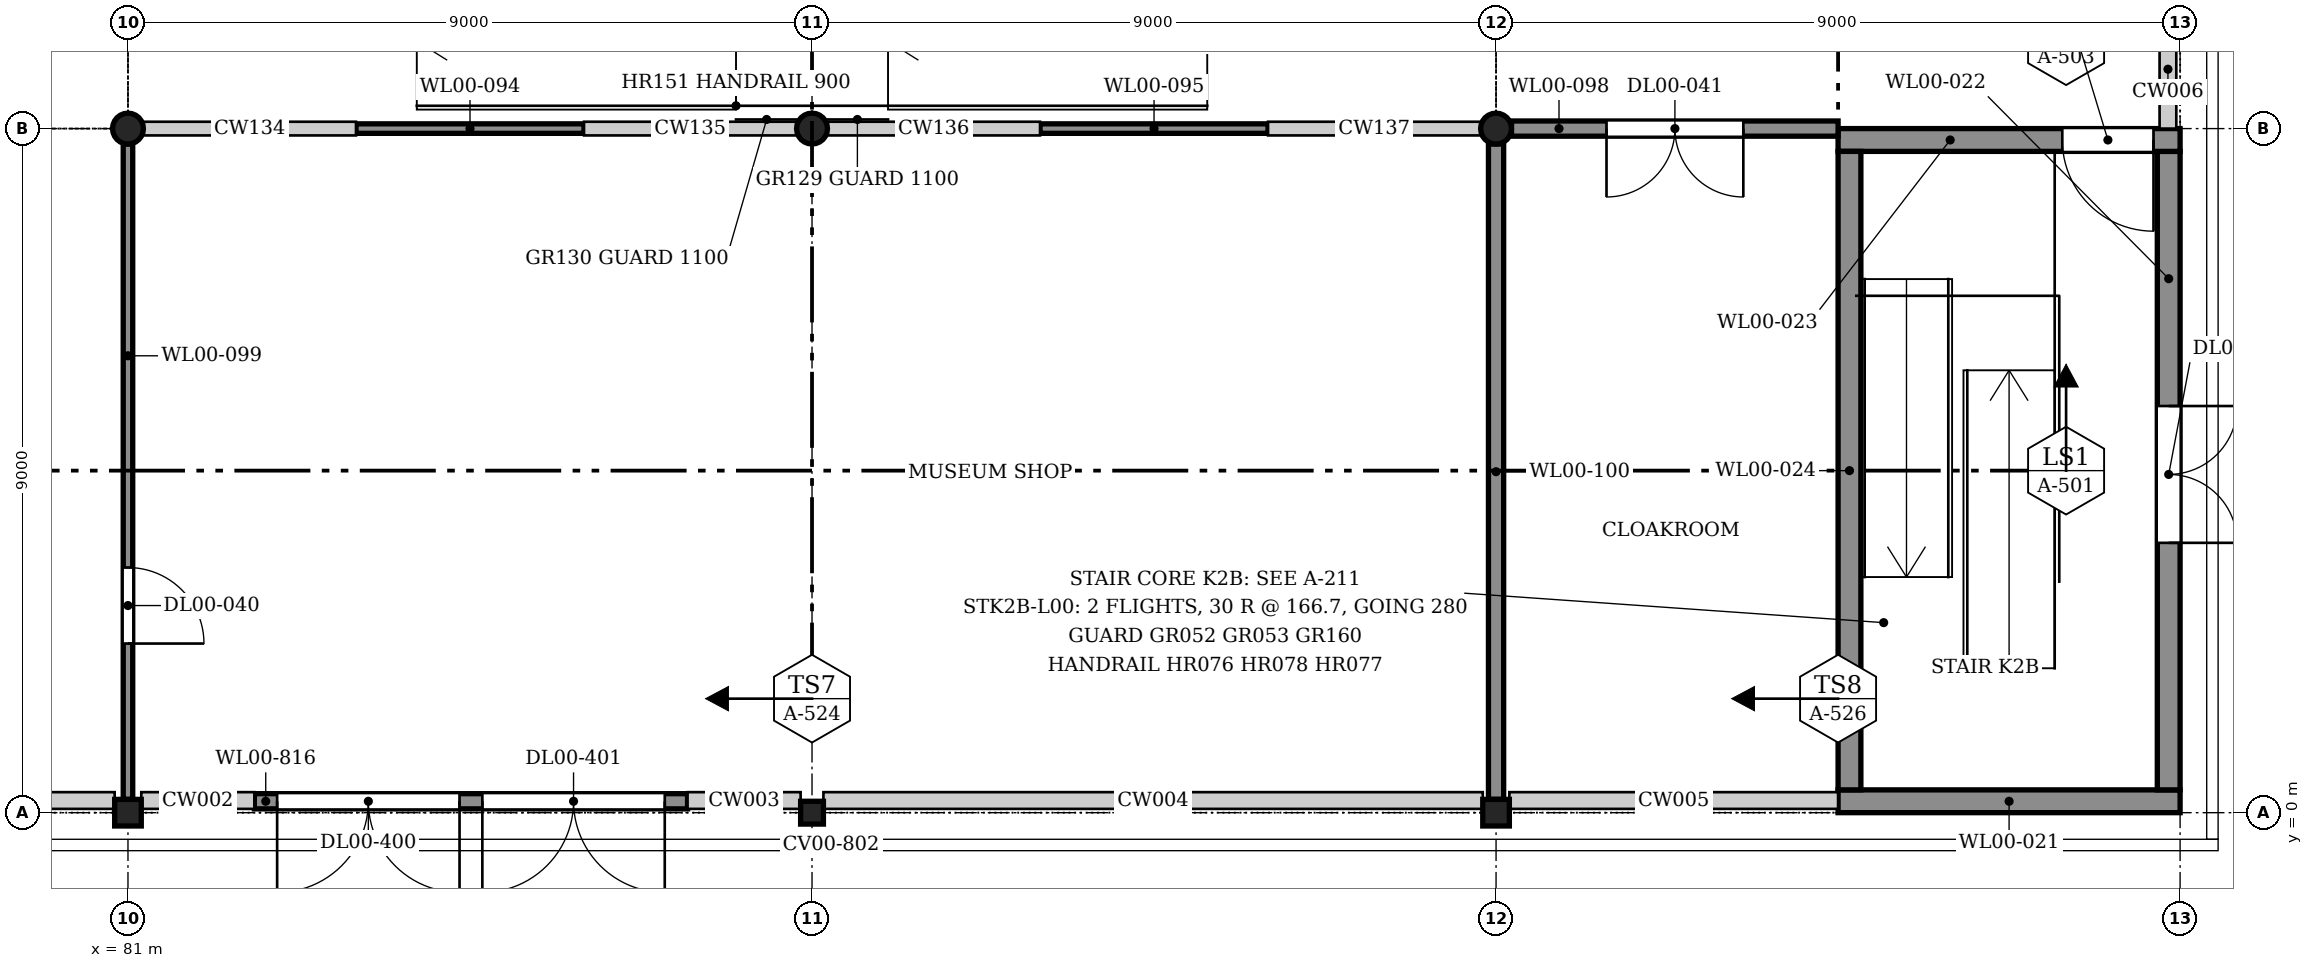
"""IFC4 building model, lengths in metres.
Left out: names, types, materials, properties, quantities, classifications, styles, units other than length and angle.
Written with IfcOpenShell. Run it as: python <this file> out.ifc"""

import sys

from ifc_helpers import new_model, si_unit, direction, frame, frame_2d, origin, origin_2d, place, context, subcontext, project, spatial, rectangle, hollow_rectangle, hollow_circle, extrude, element, fill, save


model = new_model("IFC4")
c1 = context("Model", 3, precision=1e-05, world=origin(), true_north=direction((0.0, 1.0)))
c2 = subcontext(c1, "Body", "Model", "MODEL_VIEW")
j1 = project(units=[si_unit("LENGTHUNIT", "METRE"), si_unit("PLANEANGLEUNIT", "RADIAN")], contexts=[c1])
p1 = place(None, origin())
s1 = spatial("IfcSite", under=j1, at=p1, CompositionType="ELEMENT")
p2 = place(p1, origin())
s2 = spatial("IfcBuilding", under=s1, at=p2, CompositionType="ELEMENT")
p3 = place(p2, origin())
s3 = spatial("IfcBuildingStorey", under=s2, at=p3, CompositionType="ELEMENT", Elevation=0.0)
p4 = place(p3, frame((81.0, 0.0, 0.0), z_axis=(0.0, 0.0, 1.0), x_axis=(1.0, 0.0, 0.0)))
e1 = element("IfcColumn", 1, at=p4, inside=s3, PredefinedType="COLUMN", context=c2, shape_type="SweptSolid", body=[
    extrude(hollow_rectangle(XDim=0.35, YDim=0.35, WallThickness=0.016, InnerFilletRadius=0.024, OuterFilletRadius=0.04, at=origin_2d()), origin(), (0.0, 0.0, 1.0), 5.0),
])
p5 = place(p3, frame((90.0, 0.0, 0.0), z_axis=(0.0, 0.0, 1.0), x_axis=(1.0, 0.0, 0.0)))
e2 = element("IfcColumn", 2, at=p5, inside=s3, PredefinedType="COLUMN", context=c2, shape_type="SweptSolid", body=[
    extrude(hollow_rectangle(XDim=0.3, YDim=0.3, WallThickness=0.016, InnerFilletRadius=0.024, OuterFilletRadius=0.04, at=origin_2d()), origin(), (0.0, 0.0, 1.0), 5.0),
])
p6 = place(p3, frame((99.0, 0.0, 0.0), z_axis=(0.0, 0.0, 1.0), x_axis=(1.0, 0.0, 0.0)))
e3 = element("IfcColumn", 3, at=p6, inside=s3, PredefinedType="COLUMN", context=c2, shape_type="SweptSolid", body=[
    extrude(hollow_rectangle(XDim=0.35, YDim=0.35, WallThickness=0.016, InnerFilletRadius=0.024, OuterFilletRadius=0.04, at=origin_2d()), origin(), (0.0, 0.0, 1.0), 5.0),
])
for number, where, z_axis, x_axis in (
    (4, (81.0, 9.0, 0.0), (0.0, 0.0, 1.0), (1.0, 0.0, 0.0)),
    (5, (90.0, 9.0, 0.0), (0.0, 0.0, 1.0), (1.0, 0.0, 0.0)),
    (6, (99.0, 9.0, 0.0), (0.0, 0.0, 1.0), (1.0, 0.0, 0.0)),
):
    element("IfcColumn", number, at=place(p3, frame(where, z_axis=z_axis, x_axis=x_axis)), inside=s3, PredefinedType="COLUMN", context=c2, shape_type="SweptSolid", body=[
        extrude(hollow_circle(Radius=0.203, WallThickness=0.013, at=origin_2d()), origin(), (0.0, 0.0, 1.0), 5.0),
    ])
p7 = place(p3, frame((82.663, 0.15, 0.0), z_axis=(0.0, 0.0, 1.0), x_axis=(1.0, 0.0, 0.0)))
e7 = element("IfcWall", 7, at=p7, inside=s3, PredefinedType="SOLIDWALL", context=c2, shape_type="SweptSolid", body=[
    extrude(rectangle(XDim=5.7, YDim=0.2, at=frame_2d((2.85, 0.0))), origin(), (0.0, 0.0, 1.0), 4.835),
])
p8 = place(p7, frame((0.3, 0.0, 0.0)))
e8 = element("IfcOpeningElement", 8, at=p8, cuts=e7, PredefinedType="OPENING", context=c2, shape_type="SweptSolid", body=[
    extrude(rectangle(XDim=2.4, YDim=2.4, at=frame_2d((1.2, 1.2))), frame((0.0, 0.11, 0.0), z_axis=(0.0, -1.0, 0.0), x_axis=(1.0, 0.0, 0.0)), (0.0, 0.0, 1.0), 0.22),
])
p9 = place(p7, frame((3.0, 0.0, 0.0)))
e9 = element("IfcOpeningElement", 9, at=p9, cuts=e7, PredefinedType="OPENING", context=c2, shape_type="SweptSolid", body=[
    extrude(rectangle(XDim=2.4, YDim=2.4, at=frame_2d((1.2, 1.2))), frame((0.0, 0.11, 0.0), z_axis=(0.0, -1.0, 0.0), x_axis=(1.0, 0.0, 0.0)), (0.0, 0.0, 1.0), 0.22),
])
p10 = place(p3, frame((103.5, 0.15, 0.0), z_axis=(0.0, 0.0, 1.0), x_axis=(1.0, 0.0, 0.0)))
e10 = element("IfcWall", 10, at=p10, inside=s3, PredefinedType="SOLIDWALL", context=c2, shape_type="SweptSolid", body=[
    extrude(rectangle(XDim=4.5, YDim=0.3, at=frame_2d((2.25, 0.0))), origin(), (0.0, 0.0, 1.0), 5.0),
])
p11 = place(p3, frame((107.85, 0.3, 0.0), z_axis=(0.0, 0.0, 1.0), x_axis=(0.0, 1.0, 0.0)))
e11 = element("IfcWall", 11, at=p11, inside=s3, PredefinedType="SOLIDWALL", context=c2, shape_type="SweptSolid", body=[
    extrude(rectangle(XDim=8.4, YDim=0.3, at=frame_2d((4.2, 0.0))), origin(), (0.0, 0.0, 1.0), 5.0),
])
p12 = place(p11, frame((3.25, 0.0, 0.0)))
e12 = element("IfcOpeningElement", 12, at=p12, cuts=e11, PredefinedType="OPENING", context=c2, shape_type="SweptSolid", body=[
    extrude(rectangle(XDim=1.8, YDim=2.1, at=frame_2d((0.9, 1.05))), frame((0.0, 0.16, 0.0), z_axis=(0.0, -1.0, 0.0), x_axis=(1.0, 0.0, 0.0)), (0.0, 0.0, 1.0), 0.32),
])
p13 = place(p3, frame((103.5, 8.85, 0.0), z_axis=(0.0, 0.0, 1.0), x_axis=(1.0, 0.0, 0.0)))
e13 = element("IfcWall", 13, at=p13, inside=s3, PredefinedType="SOLIDWALL", context=c2, shape_type="SweptSolid", body=[
    extrude(rectangle(XDim=4.5, YDim=0.3, at=frame_2d((2.25, 0.0))), origin(), (0.0, 0.0, 1.0), 5.0),
])
p14 = place(p13, frame((2.95, 0.0, 0.0)))
e14 = element("IfcOpeningElement", 14, at=p14, cuts=e13, PredefinedType="OPENING", context=c2, shape_type="SweptSolid", body=[
    extrude(rectangle(XDim=1.2, YDim=2.1, at=frame_2d((0.6, 1.05))), frame((0.0, 0.16, 0.0), z_axis=(0.0, -1.0, 0.0), x_axis=(1.0, 0.0, 0.0)), (0.0, 0.0, 1.0), 0.32),
])
p15 = place(p3, frame((103.65, 0.3, 0.0), z_axis=(0.0, 0.0, 1.0), x_axis=(0.0, 1.0, 0.0)))
e15 = element("IfcWall", 15, at=p15, inside=s3, PredefinedType="SOLIDWALL", context=c2, shape_type="SweptSolid", body=[
    extrude(rectangle(XDim=8.4, YDim=0.3, at=frame_2d((4.2, 0.0))), origin(), (0.0, 0.0, 1.0), 5.0),
])
for number, where, z_axis, x_axis in (
    (16, (84.0, 9.0, 0.0), (0.0, 0.0, 1.0), (1.0, 0.0, 0.0)),
    (17, (93.0, 9.0, 0.0), (0.0, 0.0, 1.0), (1.0, 0.0, 0.0)),
):
    element("IfcWall", number, at=place(p3, frame(where, z_axis=z_axis, x_axis=x_axis)), inside=s3, PredefinedType="PARTITIONING", context=c2, shape_type="SweptSolid", body=[
        extrude(rectangle(XDim=3.0, YDim=0.125, at=frame_2d((1.5, 0.0))), origin(), (0.0, 0.0, 1.0), 4.228),
    ])
p16 = place(p3, frame((99.203, 9.0, 0.0), z_axis=(0.0, 0.0, 1.0), x_axis=(1.0, 0.0, 0.0)))
e18 = element("IfcWall", 18, at=p16, inside=s3, PredefinedType="PARTITIONING", context=c2, shape_type="SweptSolid", body=[
    extrude(rectangle(XDim=4.297, YDim=0.2, at=frame_2d((2.148, 0.0))), origin(), (0.0, 0.0, 1.0), 4.302),
])
p17 = place(p16, frame((1.25, 0.0, 0.0)))
e19 = element("IfcOpeningElement", 19, at=p17, cuts=e18, PredefinedType="OPENING", context=c2, shape_type="SweptSolid", body=[
    extrude(rectangle(XDim=1.8, YDim=2.1, at=frame_2d((0.9, 1.05))), frame((0.0, 0.11, 0.0), z_axis=(0.0, -1.0, 0.0), x_axis=(1.0, 0.0, 0.0)), (0.0, 0.0, 1.0), 0.22),
])
p18 = place(p3, frame((81.0, 0.175, 0.0), z_axis=(0.0, 0.0, 1.0), x_axis=(0.0, 1.0, 0.0)))
e20 = element("IfcWall", 20, at=p18, inside=s3, PredefinedType="PARTITIONING", context=c2, shape_type="SweptSolid", body=[
    extrude(rectangle(XDim=8.622, YDim=0.125, at=frame_2d((4.311, 0.0))), origin(), (0.0, 0.0, 1.0), 4.302),
])
p19 = place(p18, frame((2.05, 0.0, 0.0)))
e21 = element("IfcOpeningElement", 21, at=p19, cuts=e20, PredefinedType="OPENING", context=c2, shape_type="SweptSolid", body=[
    extrude(rectangle(XDim=1.0, YDim=2.1, at=frame_2d((0.5, 1.05))), frame((0.0, 0.073, 0.0), z_axis=(0.0, -1.0, 0.0), x_axis=(1.0, 0.0, 0.0)), (0.0, 0.0, 1.0), 0.145),
])
p20 = place(p3, frame((99.0, 0.175, 0.0), z_axis=(0.0, 0.0, 1.0), x_axis=(0.0, 1.0, 0.0)))
e22 = element("IfcWall", 22, at=p20, inside=s3, PredefinedType="PARTITIONING", context=c2, shape_type="SweptSolid", body=[
    extrude(rectangle(XDim=8.622, YDim=0.2, at=frame_2d((4.311, 0.0))), origin(), (0.0, 0.0, 1.0), 4.302),
])
p21 = place(p8, frame((2.4, 0.0, 0.0), z_axis=(0.0, 0.0, 1.0), x_axis=(-1.0, 0.0, 0.0)))
e23 = element("IfcDoor", 23, at=p21, inside=s3, OperationType="DOUBLE_DOOR_SINGLE_SWING", PredefinedType="DOOR", context=c2, shape_type="SweptSolid", body=[
    extrude(rectangle(XDim=2.4, YDim=2.4, at=frame_2d((1.2, 1.2))), frame((0.0, 0.025, 0.0), z_axis=(0.0, -1.0, 0.0), x_axis=(1.0, 0.0, 0.0)), (0.0, 0.0, 1.0), 0.05),
])
fill(e8, e23)
p22 = place(p9, frame((2.4, 0.0, 0.0), z_axis=(0.0, 0.0, 1.0), x_axis=(-1.0, 0.0, 0.0)))
e24 = element("IfcDoor", 24, at=p22, inside=s3, OperationType="DOUBLE_DOOR_SINGLE_SWING", PredefinedType="DOOR", context=c2, shape_type="SweptSolid", body=[
    extrude(rectangle(XDim=2.4, YDim=2.4, at=frame_2d((1.2, 1.2))), frame((0.0, 0.025, 0.0), z_axis=(0.0, -1.0, 0.0), x_axis=(1.0, 0.0, 0.0)), (0.0, 0.0, 1.0), 0.05),
])
fill(e9, e24)
p23 = place(p12, frame((1.8, 0.0, 0.0), z_axis=(0.0, 0.0, 1.0), x_axis=(-1.0, 0.0, 0.0)))
e25 = element("IfcDoor", 25, at=p23, inside=s3, OperationType="DOUBLE_DOOR_SINGLE_SWING", PredefinedType="DOOR", context=c2, shape_type="SweptSolid", body=[
    extrude(rectangle(XDim=1.8, YDim=2.1, at=frame_2d((0.9, 1.05))), frame((0.0, 0.025, 0.0), z_axis=(0.0, -1.0, 0.0), x_axis=(1.0, 0.0, 0.0)), (0.0, 0.0, 1.0), 0.05),
])
fill(e12, e25)
p24 = place(p14, frame((1.2, 0.0, 0.0), z_axis=(0.0, 0.0, 1.0), x_axis=(-1.0, 0.0, 0.0)))
e26 = element("IfcDoor", 26, at=p24, inside=s3, OperationType="SINGLE_SWING_RIGHT", PredefinedType="DOOR", context=c2, shape_type="SweptSolid", body=[
    extrude(rectangle(XDim=1.2, YDim=2.1, at=frame_2d((0.6, 1.05))), frame((0.0, 0.025, 0.0), z_axis=(0.0, -1.0, 0.0), x_axis=(1.0, 0.0, 0.0)), (0.0, 0.0, 1.0), 0.05),
])
fill(e14, e26)
p25 = place(p19, frame((1.0, 0.0, 0.0), z_axis=(0.0, 0.0, 1.0), x_axis=(-1.0, 0.0, 0.0)))
e27 = element("IfcDoor", 27, at=p25, inside=s3, OperationType="SINGLE_SWING_LEFT", PredefinedType="DOOR", context=c2, shape_type="SweptSolid", body=[
    extrude(rectangle(XDim=1.0, YDim=2.1, at=frame_2d((0.5, 1.05))), frame((0.0, 0.025, 0.0), z_axis=(0.0, -1.0, 0.0), x_axis=(1.0, 0.0, 0.0)), (0.0, 0.0, 1.0), 0.05),
])
fill(e21, e27)
p26 = place(p17, frame((1.8, 0.0, 0.0), z_axis=(0.0, 0.0, 1.0), x_axis=(-1.0, 0.0, 0.0)))
e28 = element("IfcDoor", 28, at=p26, inside=s3, OperationType="DOUBLE_DOOR_SINGLE_SWING", PredefinedType="DOOR", context=c2, shape_type="SweptSolid", body=[
    extrude(rectangle(XDim=1.8, YDim=2.1, at=frame_2d((0.9, 1.05))), frame((0.0, 0.025, 0.0), z_axis=(0.0, -1.0, 0.0), x_axis=(1.0, 0.0, 0.0)), (0.0, 0.0, 1.0), 0.05),
])
fill(e19, e28)
save(model, sys.argv[1])
